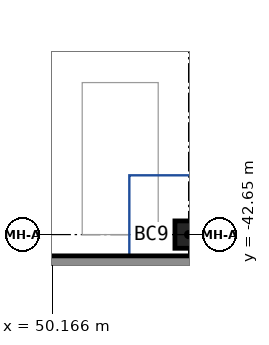
"""IFC4 building model, lengths in metres.
Left out: names, types, materials, properties, quantities, classifications, styles, units other than length and angle.
Written with IfcOpenShell. Run it as: python <this file> out.ifc"""

import sys

from ifc_helpers import new_model, si_unit, direction, frame, frame_2d, origin, origin_2d, place, context, subcontext, project, spatial, rectangle, extrude, source, transform, mapped, element, save


model = new_model("IFC4")
c1 = context("Model", 3, precision=1e-05, world=origin(), true_north=direction((0.0, 1.0)))
c2 = subcontext(c1, "Body", "Model", "MODEL_VIEW")
j1 = project(units=[si_unit("LENGTHUNIT", "METRE"), si_unit("PLANEANGLEUNIT", "RADIAN")], contexts=[c1])
p1 = place(None, origin())
s1 = spatial("IfcSite", under=j1, at=p1, CompositionType="ELEMENT")
p2 = place(p1, origin())
s2 = spatial("IfcBuilding", under=s1, at=p2, CompositionType="ELEMENT")
p3 = place(p2, frame((0.0, 0.0, -9.0)))
s3 = spatial("IfcBuildingStorey", under=s2, at=p3, CompositionType="ELEMENT", Elevation=-9.0)
m1 = source(origin(), c2, "Body", "SweptSolid", [
    extrude(rectangle(XDim=0.9, YDim=0.9, at=origin_2d()), origin(), (0.0, 0.0, 1.0), 4.5),
])
p4 = place(p3, frame((54.65, -42.65, 0.0), z_axis=(0.0, 0.0, 1.0), x_axis=(1.0, 0.0, 0.0)))
e1 = element("IfcColumn", 1, at=p4, inside=s3, PredefinedType="COLUMN", context=c2, shape_type="MappedRepresentation", body=[
    mapped(m1, transform((0.0, 0.0, 0.0))),
])
m2 = source(origin(), c2, "Body", "SweptSolid", [
    extrude(rectangle(XDim=113.0, YDim=0.5, at=frame_2d((56.5, 0.0))), origin(), (0.0, 0.0, 1.0), 4.9),
])
p5 = place(p3, frame((-57.15, -43.6, -0.4), z_axis=(0.0, 0.0, 1.0), x_axis=(1.0, 0.0, 0.0)))
e2 = element("IfcWall", 2, at=p5, inside=s3, PredefinedType="SOLIDWALL", context=c2, shape_type="MappedRepresentation", body=[
    mapped(m2, transform((0.0, 0.0, 0.0))),
])
save(model, sys.argv[1])
